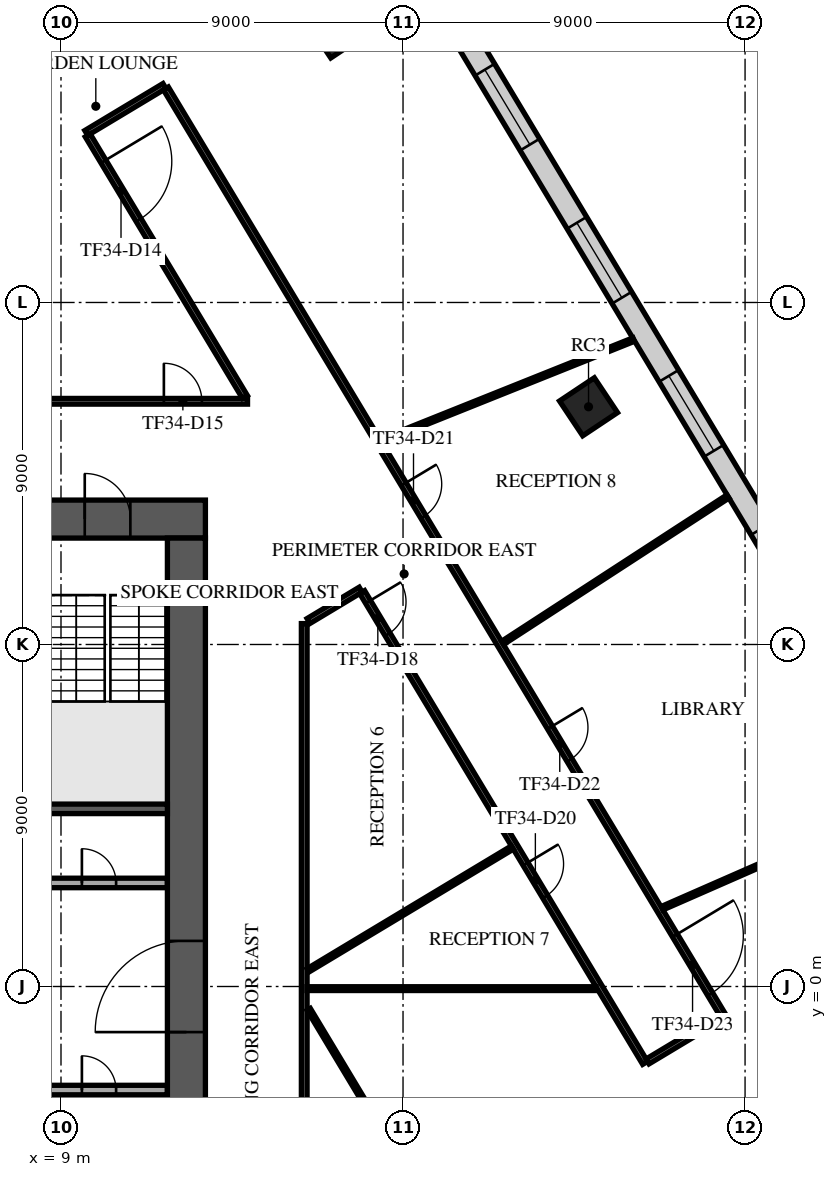
"""IFC4 building model, lengths in metres.
Left out: names, types, materials, properties, quantities, classifications, styles, units other than length and angle.
Written with IfcOpenShell. Run it as: python <this file> out.ifc"""

import sys

from ifc_helpers import new_model, si_unit, direction, frame, frame_2d, origin, origin_2d, place, context, subcontext, project, spatial, rectangle, extrude, element, fill, save


model = new_model("IFC4")
c1 = context("Model", 3, precision=1e-05, world=origin(), true_north=direction((0.0, 1.0)))
c2 = subcontext(c1, "Body", "Model", "MODEL_VIEW")
j1 = project(units=[si_unit("LENGTHUNIT", "METRE"), si_unit("PLANEANGLEUNIT", "RADIAN")], contexts=[c1])
p1 = place(None, origin())
s1 = spatial("IfcSite", under=j1, at=p1, CompositionType="ELEMENT")
p2 = place(p1, origin())
s2 = spatial("IfcBuilding", under=s1, at=p2, CompositionType="ELEMENT")
p3 = place(p2, frame((0.0, 0.0, 147.7)))
s3 = spatial("IfcBuildingStorey", under=s2, at=p3, CompositionType="ELEMENT", Elevation=147.7)
for number, where, z_axis, x_axis in (
    (1, (22.881, 15.255, 0.0), (0.0, 0.0, 1.0), (0.832, 0.555, 0.0)),
    (2, (16.252, 25.198, 0.0), (0.0, 0.0, 1.0), (0.832, 0.555, 0.0)),
):
    element("IfcColumn", number, at=place(p3, frame(where, z_axis=z_axis, x_axis=x_axis)), inside=s3, PredefinedType="COLUMN", context=c2, shape_type="SweptSolid", body=[
        extrude(rectangle(XDim=1.1, YDim=1.1, at=origin_2d()), origin(), (0.0, 0.0, 1.0), 4.0),
    ])
p4 = place(p3, frame((-12.8, 12.3, 0.0), z_axis=(0.0, 0.0, 1.0), x_axis=(1.0, 0.0, 0.0)))
e3 = element("IfcWall", 3, at=p4, inside=s3, PredefinedType="SHEAR", context=c2, shape_type="SweptSolid", body=[
    extrude(rectangle(XDim=25.6, YDim=1.0, at=frame_2d((12.8, 0.0))), origin(), (0.0, 0.0, 1.0), 3.6),
])
p5 = place(p4, frame((11.6, 0.0, 0.0)))
e4 = element("IfcOpeningElement", 4, at=p5, cuts=e3, PredefinedType="OPENING", context=c2, shape_type="SweptSolid", body=[
    extrude(rectangle(XDim=2.4, YDim=2.4, at=frame_2d((1.2, 1.2))), frame((0.0, 0.51, 0.0), z_axis=(0.0, -1.0, 0.0), x_axis=(1.0, 0.0, 0.0)), (0.0, 0.0, 1.0), 1.02),
])
p6 = place(p4, frame((22.425, 0.0, 0.0)))
e5 = element("IfcOpeningElement", 5, at=p6, cuts=e3, PredefinedType="OPENING", context=c2, shape_type="SweptSolid", body=[
    extrude(rectangle(XDim=1.2, YDim=2.1, at=frame_2d((0.6, 1.05))), frame((0.0, 0.51, 0.0), z_axis=(0.0, -1.0, 0.0), x_axis=(1.0, 0.0, 0.0)), (0.0, 0.0, 1.0), 1.02),
])
p7 = place(p4, frame((1.4, 0.0, 0.0)))
e6 = element("IfcOpeningElement", 6, at=p7, cuts=e3, PredefinedType="OPENING", context=c2, shape_type="SweptSolid", body=[
    extrude(rectangle(XDim=1.0, YDim=2.1, at=frame_2d((0.5, 1.05))), frame((0.0, 0.51, 0.0), z_axis=(0.0, -1.0, 0.0), x_axis=(1.0, 0.0, 0.0)), (0.0, 0.0, 1.0), 1.02),
])
p8 = place(p3, frame((12.3, -11.8, 0.0), z_axis=(0.0, 0.0, 1.0), x_axis=(0.0, 1.0, 0.0)))
e7 = element("IfcWall", 7, at=p8, inside=s3, PredefinedType="SHEAR", context=c2, shape_type="SweptSolid", body=[
    extrude(rectangle(XDim=23.6, YDim=1.0, at=frame_2d((11.8, 0.0))), origin(), (0.0, 0.0, 1.0), 3.6),
])
p9 = place(p8, frame((10.6, 0.0, 0.0)))
e8 = element("IfcOpeningElement", 8, at=p9, cuts=e7, PredefinedType="OPENING", context=c2, shape_type="SweptSolid", body=[
    extrude(rectangle(XDim=2.4, YDim=2.4, at=frame_2d((1.2, 1.2))), frame((0.0, 0.51, 0.0), z_axis=(0.0, -1.0, 0.0), x_axis=(1.0, 0.0, 0.0)), (0.0, 0.0, 1.0), 1.02),
])
p10 = place(p3, frame((8.65, 4.675, 0.0), z_axis=(0.0, 0.0, 1.0), x_axis=(1.0, 0.0, 0.0)))
e9 = element("IfcWall", 9, at=p10, inside=s3, PredefinedType="SOLIDWALL", context=c2, shape_type="SweptSolid", body=[
    extrude(rectangle(XDim=3.15, YDim=0.25, at=frame_2d((1.575, 0.0))), origin(), (0.0, 0.0, 1.0), 3.6),
])
p11 = place(p3, frame((5.63, -2.725, 0.0), z_axis=(0.0, 0.0, 1.0), x_axis=(1.0, 0.0, 0.0)))
e10 = element("IfcWall", 10, at=p11, inside=s3, PredefinedType="PARTITIONING", context=c2, shape_type="SweptSolid", body=[
    extrude(rectangle(XDim=6.165, YDim=0.25, at=frame_2d((3.083, 0.0))), origin(), (0.0, 0.0, 1.0), 3.6),
])
p12 = place(p11, frame((0.745, 0.0, 0.0)))
e11 = element("IfcOpeningElement", 11, at=p12, cuts=e10, PredefinedType="OPENING", context=c2, shape_type="SweptSolid", body=[
    extrude(rectangle(XDim=1.0, YDim=2.1, at=frame_2d((0.5, 1.05))), frame((0.0, 0.135, 0.0), z_axis=(0.0, -1.0, 0.0), x_axis=(1.0, 0.0, 0.0)), (0.0, 0.0, 1.0), 0.27),
])
p13 = place(p11, frame((3.92, 0.0, 0.0)))
e12 = element("IfcOpeningElement", 12, at=p13, cuts=e10, PredefinedType="OPENING", context=c2, shape_type="SweptSolid", body=[
    extrude(rectangle(XDim=0.9, YDim=2.1, at=frame_2d((0.45, 1.05))), frame((0.0, 0.135, 0.0), z_axis=(0.0, -1.0, 0.0), x_axis=(1.0, 0.0, 0.0)), (0.0, 0.0, 1.0), 0.27),
])
p14 = place(p3, frame((8.38, 2.725, 0.0), z_axis=(0.0, 0.0, 1.0), x_axis=(1.0, 0.0, 0.0)))
e13 = element("IfcWall", 13, at=p14, inside=s3, PredefinedType="PARTITIONING", context=c2, shape_type="SweptSolid", body=[
    extrude(rectangle(XDim=3.415, YDim=0.25, at=frame_2d((1.708, 0.0))), origin(), (0.0, 0.0, 1.0), 3.6),
])
p15 = place(p14, frame((1.17, 0.0, 0.0)))
e14 = element("IfcOpeningElement", 14, at=p15, cuts=e13, PredefinedType="OPENING", context=c2, shape_type="SweptSolid", body=[
    extrude(rectangle(XDim=0.9, YDim=2.1, at=frame_2d((0.45, 1.05))), frame((0.0, 0.135, 0.0), z_axis=(0.0, -1.0, 0.0), x_axis=(1.0, 0.0, 0.0)), (0.0, 0.0, 1.0), 0.27),
])
p16 = place(p3, frame((36.416, -2.94, 0.0), z_axis=(0.0, 0.0, 1.0), x_axis=(-0.515039615037, 0.857166375299, 0.0)))
e15 = element("IfcWall", 15, at=p16, inside=s3, PredefinedType="STANDARD", context=c2, shape_type="SweptSolid", body=[
    extrude(rectangle(XDim=42.176, YDim=0.6, at=frame_2d((21.088, 0.0))), origin(), (0.0, 0.0, 1.0), 3.6),
])
p17 = place(p16, frame((1.138, 0.0, 0.9)))
e16 = element("IfcOpeningElement", 16, at=p17, cuts=e15, PredefinedType="OPENING", context=c2, shape_type="SweptSolid", body=[
    extrude(rectangle(XDim=2.3, YDim=2.1, at=frame_2d((1.15, 1.05))), frame((0.0, 0.31, 0.0), z_axis=(0.0, -1.0, 0.0), x_axis=(1.0, 0.0, 0.0)), (0.0, 0.0, 1.0), 0.62),
])
p18 = place(p16, frame((5.776, 0.0, 0.9)))
e17 = element("IfcOpeningElement", 17, at=p18, cuts=e15, PredefinedType="OPENING", context=c2, shape_type="SweptSolid", body=[
    extrude(rectangle(XDim=2.3, YDim=2.1, at=frame_2d((1.15, 1.05))), frame((0.0, 0.31, 0.0), z_axis=(0.0, -1.0, 0.0), x_axis=(1.0, 0.0, 0.0)), (0.0, 0.0, 1.0), 0.62),
])
p19 = place(p16, frame((10.476, 0.0, 0.9)))
e18 = element("IfcOpeningElement", 18, at=p19, cuts=e15, PredefinedType="OPENING", context=c2, shape_type="SweptSolid", body=[
    extrude(rectangle(XDim=2.3, YDim=2.1, at=frame_2d((1.15, 1.05))), frame((0.0, 0.31, 0.0), z_axis=(0.0, -1.0, 0.0), x_axis=(1.0, 0.0, 0.0)), (0.0, 0.0, 1.0), 0.62),
])
p20 = place(p16, frame((15.176, 0.0, 0.9)))
e19 = element("IfcOpeningElement", 19, at=p20, cuts=e15, PredefinedType="OPENING", context=c2, shape_type="SweptSolid", body=[
    extrude(rectangle(XDim=2.3, YDim=2.1, at=frame_2d((1.15, 1.05))), frame((0.0, 0.31, 0.0), z_axis=(0.0, -1.0, 0.0), x_axis=(1.0, 0.0, 0.0)), (0.0, 0.0, 1.0), 0.62),
])
p21 = place(p16, frame((19.876, 0.0, 0.9)))
e20 = element("IfcOpeningElement", 20, at=p21, cuts=e15, PredefinedType="OPENING", context=c2, shape_type="SweptSolid", body=[
    extrude(rectangle(XDim=2.3, YDim=2.1, at=frame_2d((1.15, 1.05))), frame((0.0, 0.31, 0.0), z_axis=(0.0, -1.0, 0.0), x_axis=(1.0, 0.0, 0.0)), (0.0, 0.0, 1.0), 0.62),
])
p22 = place(p16, frame((24.576, 0.0, 0.9)))
e21 = element("IfcOpeningElement", 21, at=p22, cuts=e15, PredefinedType="OPENING", context=c2, shape_type="SweptSolid", body=[
    extrude(rectangle(XDim=2.3, YDim=2.1, at=frame_2d((1.15, 1.05))), frame((0.0, 0.31, 0.0), z_axis=(0.0, -1.0, 0.0), x_axis=(1.0, 0.0, 0.0)), (0.0, 0.0, 1.0), 0.62),
])
p23 = place(p16, frame((29.276, 0.0, 0.9)))
e22 = element("IfcOpeningElement", 22, at=p23, cuts=e15, PredefinedType="OPENING", context=c2, shape_type="SweptSolid", body=[
    extrude(rectangle(XDim=2.3, YDim=2.1, at=frame_2d((1.15, 1.05))), frame((0.0, 0.31, 0.0), z_axis=(0.0, -1.0, 0.0), x_axis=(1.0, 0.0, 0.0)), (0.0, 0.0, 1.0), 0.62),
])
p24 = place(p16, frame((33.976, 0.0, 0.9)))
e23 = element("IfcOpeningElement", 23, at=p24, cuts=e15, PredefinedType="OPENING", context=c2, shape_type="SweptSolid", body=[
    extrude(rectangle(XDim=2.3, YDim=2.1, at=frame_2d((1.15, 1.05))), frame((0.0, 0.31, 0.0), z_axis=(0.0, -1.0, 0.0), x_axis=(1.0, 0.0, 0.0)), (0.0, 0.0, 1.0), 0.62),
])
p25 = place(p16, frame((38.676, 0.0, 0.9)))
e24 = element("IfcOpeningElement", 24, at=p25, cuts=e15, PredefinedType="OPENING", context=c2, shape_type="SweptSolid", body=[
    extrude(rectangle(XDim=2.3, YDim=2.1, at=frame_2d((1.15, 1.05))), frame((0.0, 0.31, 0.0), z_axis=(0.0, -1.0, 0.0), x_axis=(1.0, 0.0, 0.0)), (0.0, 0.0, 1.0), 0.62),
])
p26 = place(p3, frame((-6.023, 15.4, 0.0), z_axis=(0.0, 0.0, 1.0), x_axis=(1.0, 0.0, 0.0)))
e25 = element("IfcWall", 25, at=p26, inside=s3, PredefinedType="PARTITIONING", context=c2, shape_type="SweptSolid", body=[
    extrude(rectangle(XDim=19.931, YDim=0.15, at=frame_2d((9.966, 0.0))), origin(), (0.0, 0.0, 1.0), 3.15),
])
p27 = place(p26, frame((5.8, 0.0, 0.0)))
e26 = element("IfcOpeningElement", 26, at=p27, cuts=e25, PredefinedType="OPENING", context=c2, shape_type="SweptSolid", body=[
    extrude(rectangle(XDim=1.0, YDim=2.1, at=frame_2d((0.5, 1.05))), frame((0.0, 0.085, 0.0), z_axis=(0.0, -1.0, 0.0), x_axis=(1.0, 0.0, 0.0)), (0.0, 0.0, 1.0), 0.17),
])
p28 = place(p26, frame((17.73, 0.0, 0.0)))
e27 = element("IfcOpeningElement", 27, at=p28, cuts=e25, PredefinedType="OPENING", context=c2, shape_type="SweptSolid", body=[
    extrude(rectangle(XDim=1.0, YDim=2.1, at=frame_2d((0.5, 1.05))), frame((0.0, 0.085, 0.0), z_axis=(0.0, -1.0, 0.0), x_axis=(1.0, 0.0, 0.0)), (0.0, 0.0, 1.0), 0.17),
])
p29 = place(p3, frame((9.665, 22.461, 0.0), z_axis=(0.0, 0.0, 1.0), x_axis=(0.857133645358, 0.515094082664, 0.0)))
e28 = element("IfcWall", 28, at=p29, inside=s3, PredefinedType="PARTITIONING", context=c2, shape_type="SweptSolid", body=[
    extrude(rectangle(XDim=2.4, YDim=0.15, at=frame_2d((1.2, 0.0))), origin(), (0.0, 0.0, 1.0), 3.15),
])
p30 = place(p3, frame((9.704, 22.397, 0.0), z_axis=(0.0, 0.0, 1.0), x_axis=(0.51505899604, -0.857154729671, 0.0)))
e29 = element("IfcWall", 29, at=p30, inside=s3, PredefinedType="PARTITIONING", context=c2, shape_type="SweptSolid", body=[
    extrude(rectangle(XDim=8.03, YDim=0.15, at=frame_2d((4.015, 0.0))), origin(), (0.0, 0.0, 1.0), 3.15),
])
p31 = place(p30, frame((0.8, 0.0, 0.0)))
e30 = element("IfcOpeningElement", 30, at=p31, cuts=e29, PredefinedType="OPENING", context=c2, shape_type="SweptSolid", body=[
    extrude(rectangle(XDim=1.8, YDim=2.1, at=frame_2d((0.9, 1.05))), frame((0.0, 0.085, 0.0), z_axis=(0.0, -1.0, 0.0), x_axis=(1.0, 0.0, 0.0)), (0.0, 0.0, 1.0), 0.17),
])
p32 = place(p3, frame((11.76, 23.633, 0.0), z_axis=(0.0, 0.0, 1.0), x_axis=(0.515060503771, -0.857153823684, 0.0)))
e31 = element("IfcWall", 31, at=p32, inside=s3, PredefinedType="PARTITIONING", context=c2, shape_type="SweptSolid", body=[
    extrude(rectangle(XDim=28.475, YDim=0.15, at=frame_2d((14.238, 0.0))), origin(), (0.0, 0.0, 1.0), 3.15),
])
p33 = place(p32, frame((12.149, 0.0, 0.0)))
e32 = element("IfcOpeningElement", 32, at=p33, cuts=e31, PredefinedType="OPENING", context=c2, shape_type="SweptSolid", body=[
    extrude(rectangle(XDim=1.0, YDim=2.1, at=frame_2d((0.5, 1.05))), frame((0.0, 0.085, 0.0), z_axis=(0.0, -1.0, 0.0), x_axis=(1.0, 0.0, 0.0)), (0.0, 0.0, 1.0), 0.17),
])
p34 = place(p32, frame((19.62, 0.0, 0.0)))
e33 = element("IfcOpeningElement", 33, at=p34, cuts=e31, PredefinedType="OPENING", context=c2, shape_type="SweptSolid", body=[
    extrude(rectangle(XDim=1.0, YDim=2.1, at=frame_2d((0.5, 1.05))), frame((0.0, 0.085, 0.0), z_axis=(0.0, -1.0, 0.0), x_axis=(1.0, 0.0, 0.0)), (0.0, 0.0, 1.0), 0.17),
])
p35 = place(p32, frame((26.005, 0.0, 0.0)))
e34 = element("IfcOpeningElement", 34, at=p35, cuts=e31, PredefinedType="OPENING", context=c2, shape_type="SweptSolid", body=[
    extrude(rectangle(XDim=1.8, YDim=2.1, at=frame_2d((0.9, 1.05))), frame((0.0, 0.085, 0.0), z_axis=(0.0, -1.0, 0.0), x_axis=(1.0, 0.0, 0.0)), (0.0, 0.0, 1.0), 0.17),
])
p36 = place(p3, frame((15.4, -9.867, 0.0), z_axis=(0.0, 0.0, 1.0), x_axis=(0.0, 1.0, 0.0)))
e35 = element("IfcWall", 35, at=p36, inside=s3, PredefinedType="PARTITIONING", context=c2, shape_type="SweptSolid", body=[
    extrude(rectangle(XDim=19.417, YDim=0.15, at=frame_2d((9.709, 0.0))), origin(), (0.0, 0.0, 1.0), 3.15),
])
p37 = place(p36, frame((2.55, 0.0, 0.0)))
e36 = element("IfcOpeningElement", 36, at=p37, cuts=e35, PredefinedType="OPENING", context=c2, shape_type="SweptSolid", body=[
    extrude(rectangle(XDim=1.0, YDim=2.1, at=frame_2d((0.5, 1.05))), frame((0.0, 0.085, 0.0), z_axis=(0.0, -1.0, 0.0), x_axis=(1.0, 0.0, 0.0)), (0.0, 0.0, 1.0), 0.17),
])
p38 = place(p3, frame((15.514, 9.618, 0.0), z_axis=(0.0, 0.0, 1.0), x_axis=(0.857129434102, 0.515101090268, 0.0)))
e37 = element("IfcWall", 37, at=p38, inside=s3, PredefinedType="PARTITIONING", context=c2, shape_type="SweptSolid", body=[
    extrude(rectangle(XDim=1.601, YDim=0.15, at=frame_2d((0.801, 0.0))), origin(), (0.0, 0.0, 1.0), 3.15),
])
p39 = place(p3, frame((16.925, 10.379, 0.0), z_axis=(0.0, 0.0, 1.0), x_axis=(0.515094231421, -0.857133555962, 0.0)))
e38 = element("IfcWall", 38, at=p39, inside=s3, PredefinedType="PARTITIONING", context=c2, shape_type="SweptSolid", body=[
    extrude(rectangle(XDim=14.455, YDim=0.15, at=frame_2d((7.228, 0.0))), origin(), (0.0, 0.0, 1.0), 3.15),
])
p40 = place(p39, frame((0.3, 0.0, 0.0)))
e39 = element("IfcOpeningElement", 39, at=p40, cuts=e38, PredefinedType="OPENING", context=c2, shape_type="SweptSolid", body=[
    extrude(rectangle(XDim=1.0, YDim=2.1, at=frame_2d((0.5, 1.05))), frame((0.0, 0.085, 0.0), z_axis=(0.0, -1.0, 0.0), x_axis=(1.0, 0.0, 0.0)), (0.0, 0.0, 1.0), 0.17),
])
p41 = place(p39, frame((8.348, 0.0, 0.0)))
e40 = element("IfcOpeningElement", 40, at=p41, cuts=e38, PredefinedType="OPENING", context=c2, shape_type="SweptSolid", body=[
    extrude(rectangle(XDim=1.0, YDim=2.1, at=frame_2d((0.5, 1.05))), frame((0.0, 0.085, 0.0), z_axis=(0.0, -1.0, 0.0), x_axis=(1.0, 0.0, 0.0)), (0.0, 0.0, 1.0), 0.17),
])
p42 = place(p3, frame((24.434, -1.972, 0.0), z_axis=(0.0, 0.0, 1.0), x_axis=(0.857176787658, 0.515022285634, 0.0)))
e41 = element("IfcWall", 41, at=p42, inside=s3, PredefinedType="PARTITIONING", context=c2, shape_type="SweptSolid", body=[
    extrude(rectangle(XDim=2.25, YDim=0.15, at=frame_2d((1.125, 0.0))), origin(), (0.0, 0.0, 1.0), 3.6),
])
p43 = place(p3, frame((15.475, -0.056, 0.0), z_axis=(0.0, 0.0, 1.0), x_axis=(1.0, 0.0, 0.0)))
e42 = element("IfcWall", 42, at=p43, inside=s3, PredefinedType="PARTITIONING", context=c2, shape_type="SweptSolid", body=[
    extrude(rectangle(XDim=7.602, YDim=0.1, at=frame_2d((3.801, 0.0))), origin(), (0.0, 0.0, 1.0), 3.6),
])
p44 = place(p3, frame((15.501, 0.426, 0.0), z_axis=(0.0, 0.0, 1.0), x_axis=(0.857114899057, 0.515125275845, 0.0)))
e43 = element("IfcWall", 43, at=p44, inside=s3, PredefinedType="PARTITIONING", context=c2, shape_type="SweptSolid", body=[
    extrude(rectangle(XDim=6.272, YDim=0.1, at=frame_2d((3.136, 0.0))), origin(), (0.0, 0.0, 1.0), 3.15),
])
p45 = place(p3, frame((15.518, -0.601, 0.0), z_axis=(0.0, 0.0, 1.0), x_axis=(0.515094007399, -0.857133690588, 0.0)))
e44 = element("IfcWall", 44, at=p45, inside=s3, PredefinedType="PARTITIONING", context=c2, shape_type="SweptSolid", body=[
    extrude(rectangle(XDim=7.92, YDim=0.1, at=frame_2d((3.96, 0.0))), origin(), (0.0, 0.0, 1.0), 3.15),
])
p46 = place(p3, frame((17.427, 14.364, 0.0), z_axis=(0.0, 0.0, 1.0), x_axis=(0.928344828439, 0.371720162906, 0.0)))
e45 = element("IfcWall", 45, at=p46, inside=s3, PredefinedType="PARTITIONING", context=c2, shape_type="SweptSolid", body=[
    extrude(rectangle(XDim=7.154, YDim=0.1, at=frame_2d((3.577, 0.0))), origin(), (0.0, 0.0, 1.0), 2.9),
])
p47 = place(p3, frame((20.618, 9.042, 0.0), z_axis=(0.0, 0.0, 1.0), x_axis=(0.838556384035, 0.544814822479, 0.0)))
e46 = element("IfcWall", 46, at=p47, inside=s3, PredefinedType="PARTITIONING", context=c2, shape_type="SweptSolid", body=[
    extrude(rectangle(XDim=7.072, YDim=0.1, at=frame_2d((3.536, 0.0))), origin(), (0.0, 0.0, 1.0), 2.9),
])
p48 = place(p3, frame((24.818, 2.061, 0.0), z_axis=(0.0, 0.0, 1.0), x_axis=(0.915839969102, 0.401543460905, 0.0)))
e47 = element("IfcWall", 47, at=p48, inside=s3, PredefinedType="PARTITIONING", context=c2, shape_type="SweptSolid", body=[
    extrude(rectangle(XDim=7.122, YDim=0.1, at=frame_2d((3.561, 0.0))), origin(), (0.0, 0.0, 1.0), 2.9),
])
p49 = place(p6, origin())
e48 = element("IfcDoor", 48, at=p49, inside=s3, OperationType="SINGLE_SWING_LEFT", PredefinedType="DOOR", context=c2, shape_type="SweptSolid", body=[
    extrude(rectangle(XDim=1.2, YDim=2.1, at=frame_2d((0.6, 1.05))), frame((0.0, 0.025, 0.0), z_axis=(0.0, -1.0, 0.0), x_axis=(1.0, 0.0, 0.0)), (0.0, 0.0, 1.0), 0.05),
])
fill(e5, e48)
p50 = place(p9, origin())
e49 = element("IfcDoor", 49, at=p50, inside=s3, OperationType="SINGLE_SWING_LEFT", PredefinedType="DOOR", context=c2, shape_type="SweptSolid", body=[
    extrude(rectangle(XDim=2.4, YDim=2.4, at=frame_2d((1.2, 1.2))), frame((0.0, 0.025, 0.0), z_axis=(0.0, -1.0, 0.0), x_axis=(1.0, 0.0, 0.0)), (0.0, 0.0, 1.0), 0.05),
])
fill(e8, e49)
p51 = place(p15, origin())
e50 = element("IfcDoor", 50, at=p51, inside=s3, OperationType="SINGLE_SWING_LEFT", PredefinedType="DOOR", context=c2, shape_type="SweptSolid", body=[
    extrude(rectangle(XDim=0.9, YDim=2.1, at=frame_2d((0.45, 1.05))), frame((0.0, 0.025, 0.0), z_axis=(0.0, -1.0, 0.0), x_axis=(1.0, 0.0, 0.0)), (0.0, 0.0, 1.0), 0.05),
])
fill(e14, e50)
p52 = place(p13, origin())
e51 = element("IfcDoor", 51, at=p52, inside=s3, OperationType="SINGLE_SWING_LEFT", PredefinedType="DOOR", context=c2, shape_type="SweptSolid", body=[
    extrude(rectangle(XDim=0.9, YDim=2.1, at=frame_2d((0.45, 1.05))), frame((0.0, 0.025, 0.0), z_axis=(0.0, -1.0, 0.0), x_axis=(1.0, 0.0, 0.0)), (0.0, 0.0, 1.0), 0.05),
])
fill(e12, e51)
p53 = place(p21, origin())
e52 = element("IfcWindow", 52, at=p53, inside=s3, PartitioningType="SINGLE_PANEL", PredefinedType="WINDOW", context=c2, shape_type="SweptSolid", body=[
    extrude(rectangle(XDim=2.3, YDim=2.1, at=frame_2d((1.15, 1.05))), frame((0.0, 0.03, 0.0), z_axis=(0.0, -1.0, 0.0), x_axis=(1.0, 0.0, 0.0)), (0.0, 0.0, 1.0), 0.06),
])
fill(e20, e52)
p54 = place(p22, origin())
e53 = element("IfcWindow", 53, at=p54, inside=s3, PartitioningType="SINGLE_PANEL", PredefinedType="WINDOW", context=c2, shape_type="SweptSolid", body=[
    extrude(rectangle(XDim=2.3, YDim=2.1, at=frame_2d((1.15, 1.05))), frame((0.0, 0.03, 0.0), z_axis=(0.0, -1.0, 0.0), x_axis=(1.0, 0.0, 0.0)), (0.0, 0.0, 1.0), 0.06),
])
fill(e21, e53)
p55 = place(p23, origin())
e54 = element("IfcWindow", 54, at=p55, inside=s3, PartitioningType="SINGLE_PANEL", PredefinedType="WINDOW", context=c2, shape_type="SweptSolid", body=[
    extrude(rectangle(XDim=2.3, YDim=2.1, at=frame_2d((1.15, 1.05))), frame((0.0, 0.03, 0.0), z_axis=(0.0, -1.0, 0.0), x_axis=(1.0, 0.0, 0.0)), (0.0, 0.0, 1.0), 0.06),
])
fill(e22, e54)
p56 = place(p31, frame((1.8, 0.0, 0.0), z_axis=(0.0, 0.0, 1.0), x_axis=(-1.0, 0.0, 0.0)))
e55 = element("IfcDoor", 55, at=p56, inside=s3, OperationType="DOUBLE_DOOR_SINGLE_SWING", PredefinedType="DOOR", context=c2, shape_type="SweptSolid", body=[
    extrude(rectangle(XDim=1.8, YDim=2.1, at=frame_2d((0.9, 1.05))), frame((0.0, 0.025, 0.0), z_axis=(0.0, -1.0, 0.0), x_axis=(1.0, 0.0, 0.0)), (0.0, 0.0, 1.0), 0.05),
])
fill(e30, e55)
p57 = place(p28, origin())
e56 = element("IfcDoor", 56, at=p57, inside=s3, OperationType="SINGLE_SWING_RIGHT", PredefinedType="DOOR", context=c2, shape_type="SweptSolid", body=[
    extrude(rectangle(XDim=1.0, YDim=2.1, at=frame_2d((0.5, 1.05))), frame((0.0, 0.025, 0.0), z_axis=(0.0, -1.0, 0.0), x_axis=(1.0, 0.0, 0.0)), (0.0, 0.0, 1.0), 0.05),
])
fill(e27, e56)
p58 = place(p40, frame((1.0, 0.0, 0.0), z_axis=(0.0, 0.0, 1.0), x_axis=(-1.0, 0.0, 0.0)))
e57 = element("IfcDoor", 57, at=p58, inside=s3, OperationType="SINGLE_SWING_RIGHT", PredefinedType="DOOR", context=c2, shape_type="SweptSolid", body=[
    extrude(rectangle(XDim=1.0, YDim=2.1, at=frame_2d((0.5, 1.05))), frame((0.0, 0.025, 0.0), z_axis=(0.0, -1.0, 0.0), x_axis=(1.0, 0.0, 0.0)), (0.0, 0.0, 1.0), 0.05),
])
fill(e39, e57)
p59 = place(p41, frame((1.0, 0.0, 0.0), z_axis=(0.0, 0.0, 1.0), x_axis=(-1.0, 0.0, 0.0)))
e58 = element("IfcDoor", 58, at=p59, inside=s3, OperationType="SINGLE_SWING_RIGHT", PredefinedType="DOOR", context=c2, shape_type="SweptSolid", body=[
    extrude(rectangle(XDim=1.0, YDim=2.1, at=frame_2d((0.5, 1.05))), frame((0.0, 0.025, 0.0), z_axis=(0.0, -1.0, 0.0), x_axis=(1.0, 0.0, 0.0)), (0.0, 0.0, 1.0), 0.05),
])
fill(e40, e58)
p60 = place(p33, origin())
e59 = element("IfcDoor", 59, at=p60, inside=s3, OperationType="SINGLE_SWING_LEFT", PredefinedType="DOOR", context=c2, shape_type="SweptSolid", body=[
    extrude(rectangle(XDim=1.0, YDim=2.1, at=frame_2d((0.5, 1.05))), frame((0.0, 0.025, 0.0), z_axis=(0.0, -1.0, 0.0), x_axis=(1.0, 0.0, 0.0)), (0.0, 0.0, 1.0), 0.05),
])
fill(e32, e59)
p61 = place(p34, origin())
e60 = element("IfcDoor", 60, at=p61, inside=s3, OperationType="SINGLE_SWING_LEFT", PredefinedType="DOOR", context=c2, shape_type="SweptSolid", body=[
    extrude(rectangle(XDim=1.0, YDim=2.1, at=frame_2d((0.5, 1.05))), frame((0.0, 0.025, 0.0), z_axis=(0.0, -1.0, 0.0), x_axis=(1.0, 0.0, 0.0)), (0.0, 0.0, 1.0), 0.05),
])
fill(e33, e60)
p62 = place(p35, origin())
e61 = element("IfcDoor", 61, at=p62, inside=s3, OperationType="DOUBLE_DOOR_SINGLE_SWING", PredefinedType="DOOR", context=c2, shape_type="SweptSolid", body=[
    extrude(rectangle(XDim=1.8, YDim=2.1, at=frame_2d((0.9, 1.05))), frame((0.0, 0.025, 0.0), z_axis=(0.0, -1.0, 0.0), x_axis=(1.0, 0.0, 0.0)), (0.0, 0.0, 1.0), 0.05),
])
fill(e34, e61)
save(model, sys.argv[1])
